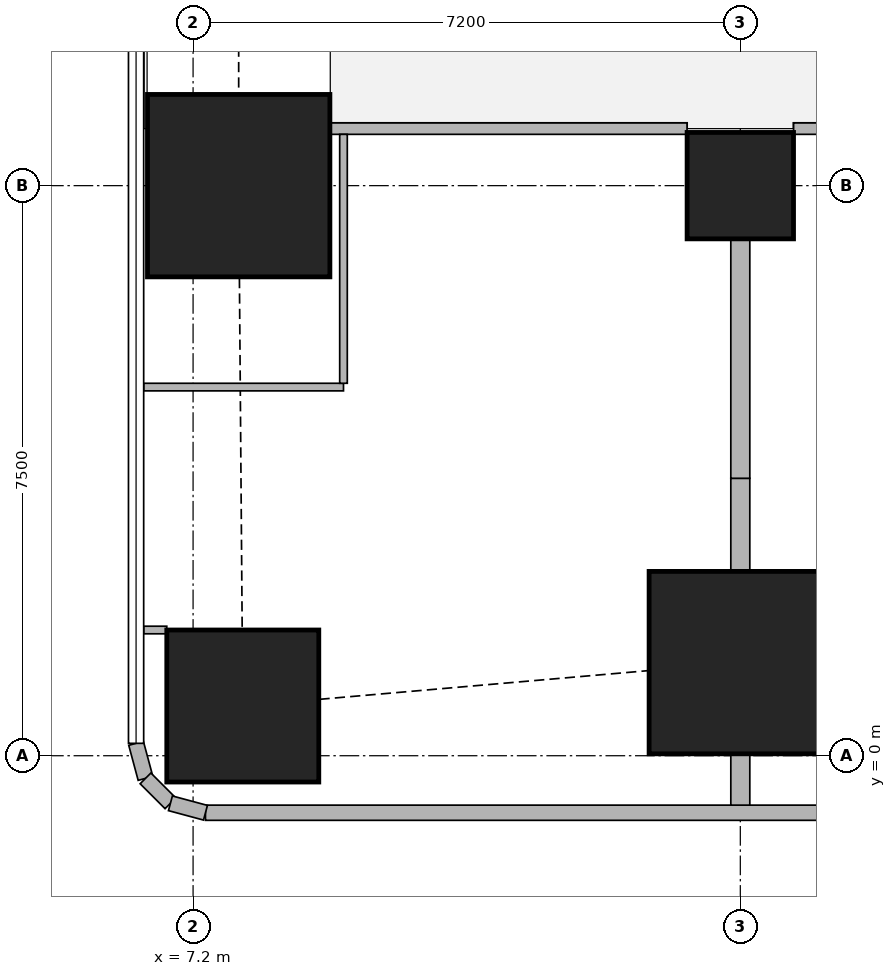
"""IFC4 building model, lengths in metres.
Left out: names, types, materials, properties, quantities, classifications, styles, units other than length and angle.
Written with IfcOpenShell. Run it as: python <this file> out.ifc"""

import sys

from ifc_helpers import new_model, si_unit, direction, frame, frame_2d, origin, origin_2d, place, context, subcontext, project, spatial, rectangle, extrude, element, fill, save


model = new_model("IFC4")
c1 = context("Model", 3, precision=1e-05, world=origin(), true_north=direction((0.0, 1.0)))
c2 = subcontext(c1, "Body", "Model", "MODEL_VIEW")
j1 = project(units=[si_unit("LENGTHUNIT", "METRE"), si_unit("PLANEANGLEUNIT", "RADIAN")], contexts=[c1])
p1 = place(None, origin())
s1 = spatial("IfcSite", under=j1, at=p1, CompositionType="ELEMENT")
p2 = place(p1, origin())
s2 = spatial("IfcBuilding", under=s1, at=p2, CompositionType="ELEMENT")
p3 = place(p2, frame((0.0, 0.0, 216.2)))
s3 = spatial("IfcBuildingStorey", under=s2, at=p3, CompositionType="ELEMENT", Elevation=216.2)
p4 = place(p3, frame((7.854, 0.654, 0.0), z_axis=(0.0, 0.0, 1.0), x_axis=(1.0, 0.0, 0.0)))
e1 = element("IfcColumn", 1, at=p4, inside=s3, PredefinedType="COLUMN", context=c2, shape_type="SweptSolid", body=[
    extrude(rectangle(XDim=2.0, YDim=2.0, at=origin_2d()), origin(), (0.0, 0.0, 1.0), 3.75),
])
for number, where, z_axis, x_axis in (
    (2, (14.4, 1.225, 0.0), (0.0, 0.0, 1.0), (1.0, 0.0, 0.0)),
    (3, (7.8, 7.5, 0.0), (0.0, 0.0, 1.0), (1.0, 0.0, 0.0)),
):
    element("IfcColumn", number, at=place(p3, frame(where, z_axis=z_axis, x_axis=x_axis)), inside=s3, PredefinedType="COLUMN", context=c2, shape_type="SweptSolid", body=[
        extrude(rectangle(XDim=2.4, YDim=2.4, at=origin_2d()), origin(), (0.0, 0.0, 1.0), 3.75),
    ])
p5 = place(p3, frame((14.4, 7.5, 0.0), z_axis=(0.0, 0.0, 1.0), x_axis=(1.0, 0.0, 0.0)))
e4 = element("IfcColumn", 4, at=p5, inside=s3, PredefinedType="COLUMN", context=c2, shape_type="SweptSolid", body=[
    extrude(rectangle(XDim=1.4, YDim=1.4, at=origin_2d()), origin(), (0.0, 0.0, 1.0), 3.75),
])
p6 = place(p3, frame((7.363, -0.75, 0.0), z_axis=(0.0, 0.0, 1.0), x_axis=(1.0, 0.0, 0.0)))
e5 = element("IfcWall", 5, at=p6, inside=s3, PredefinedType="SOLIDWALL", context=c2, shape_type="SweptSolid", body=[
    extrude(rectangle(XDim=40.428, YDim=0.2, at=frame_2d((20.214, 0.0))), origin(), (0.0, 0.0, 1.0), 3.5),
])
p7 = place(p6, frame((2.319, 0.0, 0.9)))
e6 = element("IfcOpeningElement", 6, at=p7, cuts=e5, PredefinedType="OPENING", context=c2, shape_type="SweptSolid", body=[
    extrude(rectangle(XDim=2.4, YDim=1.5, at=frame_2d((1.2, 0.75))), frame((0.0, 0.11, 0.0), z_axis=(0.0, -1.0, 0.0), x_axis=(1.0, 0.0, 0.0)), (0.0, 0.0, 1.0), 0.22),
])
p8 = place(p6, frame((7.937, 0.0, 0.9)))
e7 = element("IfcOpeningElement", 7, at=p8, cuts=e5, PredefinedType="OPENING", context=c2, shape_type="SweptSolid", body=[
    extrude(rectangle(XDim=1.8, YDim=1.5, at=frame_2d((0.9, 0.75))), frame((0.0, 0.11, 0.0), z_axis=(0.0, -1.0, 0.0), x_axis=(1.0, 0.0, 0.0)), (0.0, 0.0, 1.0), 0.22),
])
p9 = place(p6, frame((11.537, 0.0, 0.9)))
e8 = element("IfcOpeningElement", 8, at=p9, cuts=e5, PredefinedType="OPENING", context=c2, shape_type="SweptSolid", body=[
    extrude(rectangle(XDim=1.8, YDim=1.5, at=frame_2d((0.9, 0.75))), frame((0.0, 0.11, 0.0), z_axis=(0.0, -1.0, 0.0), x_axis=(1.0, 0.0, 0.0)), (0.0, 0.0, 1.0), 0.22),
])
p10 = place(p6, frame((15.137, 0.0, 0.9)))
e9 = element("IfcOpeningElement", 9, at=p10, cuts=e5, PredefinedType="OPENING", context=c2, shape_type="SweptSolid", body=[
    extrude(rectangle(XDim=1.8, YDim=1.5, at=frame_2d((0.9, 0.75))), frame((0.0, 0.11, 0.0), z_axis=(0.0, -1.0, 0.0), x_axis=(1.0, 0.0, 0.0)), (0.0, 0.0, 1.0), 0.22),
])
p11 = place(p6, frame((18.737, 0.0, 0.9)))
e10 = element("IfcOpeningElement", 10, at=p11, cuts=e5, PredefinedType="OPENING", context=c2, shape_type="SweptSolid", body=[
    extrude(rectangle(XDim=1.8, YDim=1.5, at=frame_2d((0.9, 0.75))), frame((0.0, 0.11, 0.0), z_axis=(0.0, -1.0, 0.0), x_axis=(1.0, 0.0, 0.0)), (0.0, 0.0, 1.0), 0.22),
])
p12 = place(p6, frame((22.337, 0.0, 0.9)))
e11 = element("IfcOpeningElement", 11, at=p12, cuts=e5, PredefinedType="OPENING", context=c2, shape_type="SweptSolid", body=[
    extrude(rectangle(XDim=1.8, YDim=1.5, at=frame_2d((0.9, 0.75))), frame((0.0, 0.11, 0.0), z_axis=(0.0, -1.0, 0.0), x_axis=(1.0, 0.0, 0.0)), (0.0, 0.0, 1.0), 0.22),
])
p13 = place(p6, frame((25.937, 0.0, 0.9)))
e12 = element("IfcOpeningElement", 12, at=p13, cuts=e5, PredefinedType="OPENING", context=c2, shape_type="SweptSolid", body=[
    extrude(rectangle(XDim=1.8, YDim=1.5, at=frame_2d((0.9, 0.75))), frame((0.0, 0.11, 0.0), z_axis=(0.0, -1.0, 0.0), x_axis=(1.0, 0.0, 0.0)), (0.0, 0.0, 1.0), 0.22),
])
p14 = place(p6, frame((29.537, 0.0, 0.9)))
e13 = element("IfcOpeningElement", 13, at=p14, cuts=e5, PredefinedType="OPENING", context=c2, shape_type="SweptSolid", body=[
    extrude(rectangle(XDim=1.8, YDim=1.5, at=frame_2d((0.9, 0.75))), frame((0.0, 0.11, 0.0), z_axis=(0.0, -1.0, 0.0), x_axis=(1.0, 0.0, 0.0)), (0.0, 0.0, 1.0), 0.22),
])
p15 = place(p6, frame((33.137, 0.0, 0.9)))
e14 = element("IfcOpeningElement", 14, at=p15, cuts=e5, PredefinedType="OPENING", context=c2, shape_type="SweptSolid", body=[
    extrude(rectangle(XDim=1.8, YDim=1.5, at=frame_2d((0.9, 0.75))), frame((0.0, 0.11, 0.0), z_axis=(0.0, -1.0, 0.0), x_axis=(1.0, 0.0, 0.0)), (0.0, 0.0, 1.0), 0.22),
])
p16 = place(p3, frame((6.45, 0.163, 0.0), z_axis=(0.0, 0.0, 1.0), x_axis=(0.259698463175, -0.965689757751, 0.0)))
e15 = element("IfcWall", 15, at=p16, inside=s3, PredefinedType="SOLIDWALL", context=c2, shape_type="SweptSolid", body=[
    extrude(rectangle(XDim=0.478, YDim=0.2, at=frame_2d((0.239, 0.0))), origin(), (0.0, 0.0, 1.0), 3.5),
])
p17 = place(p3, frame((6.574, -0.298, 0.0), z_axis=(0.0, 0.0, 1.0), x_axis=(0.707369890659, -0.706843573776, 0.0)))
e16 = element("IfcWall", 16, at=p17, inside=s3, PredefinedType="SOLIDWALL", context=c2, shape_type="SweptSolid", body=[
    extrude(rectangle(XDim=0.464, YDim=0.2, at=frame_2d((0.232, 0.0))), origin(), (0.0, 0.0, 1.0), 3.5),
])
p18 = place(p3, frame((6.902, -0.626, 0.0), z_axis=(0.0, 0.0, 1.0), x_axis=(0.965655254015, -0.259826731483, 0.0)))
e17 = element("IfcWall", 17, at=p18, inside=s3, PredefinedType="SOLIDWALL", context=c2, shape_type="SweptSolid", body=[
    extrude(rectangle(XDim=0.477, YDim=0.2, at=frame_2d((0.239, 0.0))), origin(), (0.0, 0.0, 1.0), 3.5),
])
p19 = place(p3, frame((20.899, 8.25, 0.0), z_axis=(0.0, 0.0, 1.0), x_axis=(-1.0, 0.0, 0.0)))
e18 = element("IfcWall", 18, at=p19, inside=s3, PredefinedType="SOLIDWALL", context=c2, shape_type="SweptSolid", body=[
    extrude(rectangle(XDim=5.798, YDim=0.15, at=frame_2d((2.899, 0.0))), origin(), (0.0, 0.0, 1.0), 3.5),
])
p20 = place(p19, frame((3.999, 0.0, 0.0)))
e19 = element("IfcOpeningElement", 19, at=p20, cuts=e18, PredefinedType="OPENING", context=c2, shape_type="SweptSolid", body=[
    extrude(rectangle(XDim=1.0, YDim=2.1, at=frame_2d((0.5, 1.05))), frame((0.0, 0.085, 0.0), z_axis=(0.0, -1.0, 0.0), x_axis=(1.0, 0.0, 0.0)), (0.0, 0.0, 1.0), 0.17),
])
p21 = place(p3, frame((13.699, 8.25, 0.0), z_axis=(0.0, 0.0, 1.0), x_axis=(-1.0, 0.0, 0.0)))
e20 = element("IfcWall", 20, at=p21, inside=s3, PredefinedType="SOLIDWALL", context=c2, shape_type="SweptSolid", body=[
    extrude(rectangle(XDim=4.698, YDim=0.15, at=frame_2d((2.349, 0.0))), origin(), (0.0, 0.0, 1.0), 3.5),
])
p22 = place(p21, frame((3.345, 0.0, 0.0)))
e21 = element("IfcOpeningElement", 21, at=p22, cuts=e20, PredefinedType="OPENING", context=c2, shape_type="SweptSolid", body=[
    extrude(rectangle(XDim=1.0, YDim=2.1, at=frame_2d((0.5, 1.05))), frame((0.0, 0.085, 0.0), z_axis=(0.0, -1.0, 0.0), x_axis=(1.0, 0.0, 0.0)), (0.0, 0.0, 1.0), 0.17),
])
p23 = place(p3, frame((6.55, 1.654, 0.0), z_axis=(0.0, 0.0, 1.0), x_axis=(1.0, 0.0, 0.0)))
e22 = element("IfcWall", 22, at=p23, inside=s3, PredefinedType="PARTITIONING", context=c2, shape_type="SweptSolid", body=[
    extrude(rectangle(XDim=0.304, YDim=0.1, at=frame_2d((0.152, 0.0))), origin(), (0.0, 0.0, 1.0), 2.05),
])
p24 = place(p3, frame((9.179, 4.85, 0.0), z_axis=(0.0, 0.0, 1.0), x_axis=(-1.0, 0.0, 0.0)))
e23 = element("IfcWall", 23, at=p24, inside=s3, PredefinedType="PARTITIONING", context=c2, shape_type="SweptSolid", body=[
    extrude(rectangle(XDim=2.629, YDim=0.1, at=frame_2d((1.314, 0.0))), origin(), (0.0, 0.0, 1.0), 2.05),
])
p25 = place(p3, frame((9.179, 4.9, 0.0), z_axis=(0.0, 0.0, 1.0), x_axis=(0.0, 1.0, 0.0)))
e24 = element("IfcWall", 24, at=p25, inside=s3, PredefinedType="PARTITIONING", context=c2, shape_type="SweptSolid", body=[
    extrude(rectangle(XDim=3.275, YDim=0.1, at=frame_2d((1.638, 0.0))), origin(), (0.0, 0.0, 1.0), 3.5),
])
p26 = place(p25, frame((0.15, 0.0, 0.0)))
e25 = element("IfcOpeningElement", 25, at=p26, cuts=e24, PredefinedType="OPENING", context=c2, shape_type="SweptSolid", body=[
    extrude(rectangle(XDim=0.9, YDim=2.1, at=frame_2d((0.45, 1.05))), frame((0.0, 0.06, 0.0), z_axis=(0.0, -1.0, 0.0), x_axis=(1.0, 0.0, 0.0)), (0.0, 0.0, 1.0), 0.12),
])
p27 = place(p3, frame((14.4, -0.65, 0.0), z_axis=(0.0, 0.0, 1.0), x_axis=(0.0, 1.0, 0.0)))
e26 = element("IfcWall", 26, at=p27, inside=s3, PredefinedType="SOLIDWALL", context=c2, shape_type="SweptSolid", body=[
    extrude(rectangle(XDim=0.674, YDim=0.25, at=frame_2d((0.337, 0.0))), origin(), (0.0, 0.0, 1.0), 2.05),
])
p28 = place(p3, frame((14.4, 2.426, 0.0), z_axis=(0.0, 0.0, 1.0), x_axis=(0.0, 1.0, 0.0)))
e27 = element("IfcWall", 27, at=p28, inside=s3, PredefinedType="SOLIDWALL", context=c2, shape_type="SweptSolid", body=[
    extrude(rectangle(XDim=1.224, YDim=0.25, at=frame_2d((0.612, 0.0))), origin(), (0.0, 0.0, 1.0), 2.05),
])
p29 = place(p3, frame((14.4, 3.65, 0.0), z_axis=(0.0, 0.0, 1.0), x_axis=(0.0, 1.0, 0.0)))
e28 = element("IfcWall", 28, at=p29, inside=s3, PredefinedType="SOLIDWALL", context=c2, shape_type="SweptSolid", body=[
    extrude(rectangle(XDim=3.149, YDim=0.25, at=frame_2d((1.575, 0.0))), origin(), (0.0, 0.0, 1.0), 3.5),
])
p30 = place(p7, origin())
e29 = element("IfcWindow", 29, at=p30, inside=s3, PartitioningType="SINGLE_PANEL", PredefinedType="WINDOW", context=c2, shape_type="SweptSolid", body=[
    extrude(rectangle(XDim=2.4, YDim=1.5, at=frame_2d((1.2, 0.75))), frame((0.0, 0.03, 0.0), z_axis=(0.0, -1.0, 0.0), x_axis=(1.0, 0.0, 0.0)), (0.0, 0.0, 1.0), 0.06),
])
fill(e6, e29)
p31 = place(p8, origin())
e30 = element("IfcWindow", 30, at=p31, inside=s3, PartitioningType="SINGLE_PANEL", PredefinedType="WINDOW", context=c2, shape_type="SweptSolid", body=[
    extrude(rectangle(XDim=1.8, YDim=1.5, at=frame_2d((0.9, 0.75))), frame((0.0, 0.03, 0.0), z_axis=(0.0, -1.0, 0.0), x_axis=(1.0, 0.0, 0.0)), (0.0, 0.0, 1.0), 0.06),
])
fill(e7, e30)
p32 = place(p26, origin())
e31 = element("IfcDoor", 31, at=p32, inside=s3, OperationType="SINGLE_SWING_LEFT", PredefinedType="DOOR", context=c2, shape_type="SweptSolid", body=[
    extrude(rectangle(XDim=0.9, YDim=2.1, at=frame_2d((0.45, 1.05))), frame((0.0, 0.025, 0.0), z_axis=(0.0, -1.0, 0.0), x_axis=(1.0, 0.0, 0.0)), (0.0, 0.0, 1.0), 0.05),
])
fill(e25, e31)
p33 = place(p22, origin())
e32 = element("IfcDoor", 32, at=p33, inside=s3, OperationType="SINGLE_SWING_LEFT", PredefinedType="DOOR", context=c2, shape_type="SweptSolid", body=[
    extrude(rectangle(XDim=1.0, YDim=2.1, at=frame_2d((0.5, 1.05))), frame((0.0, 0.025, 0.0), z_axis=(0.0, -1.0, 0.0), x_axis=(1.0, 0.0, 0.0)), (0.0, 0.0, 1.0), 0.05),
])
fill(e21, e32)
save(model, sys.argv[1])
